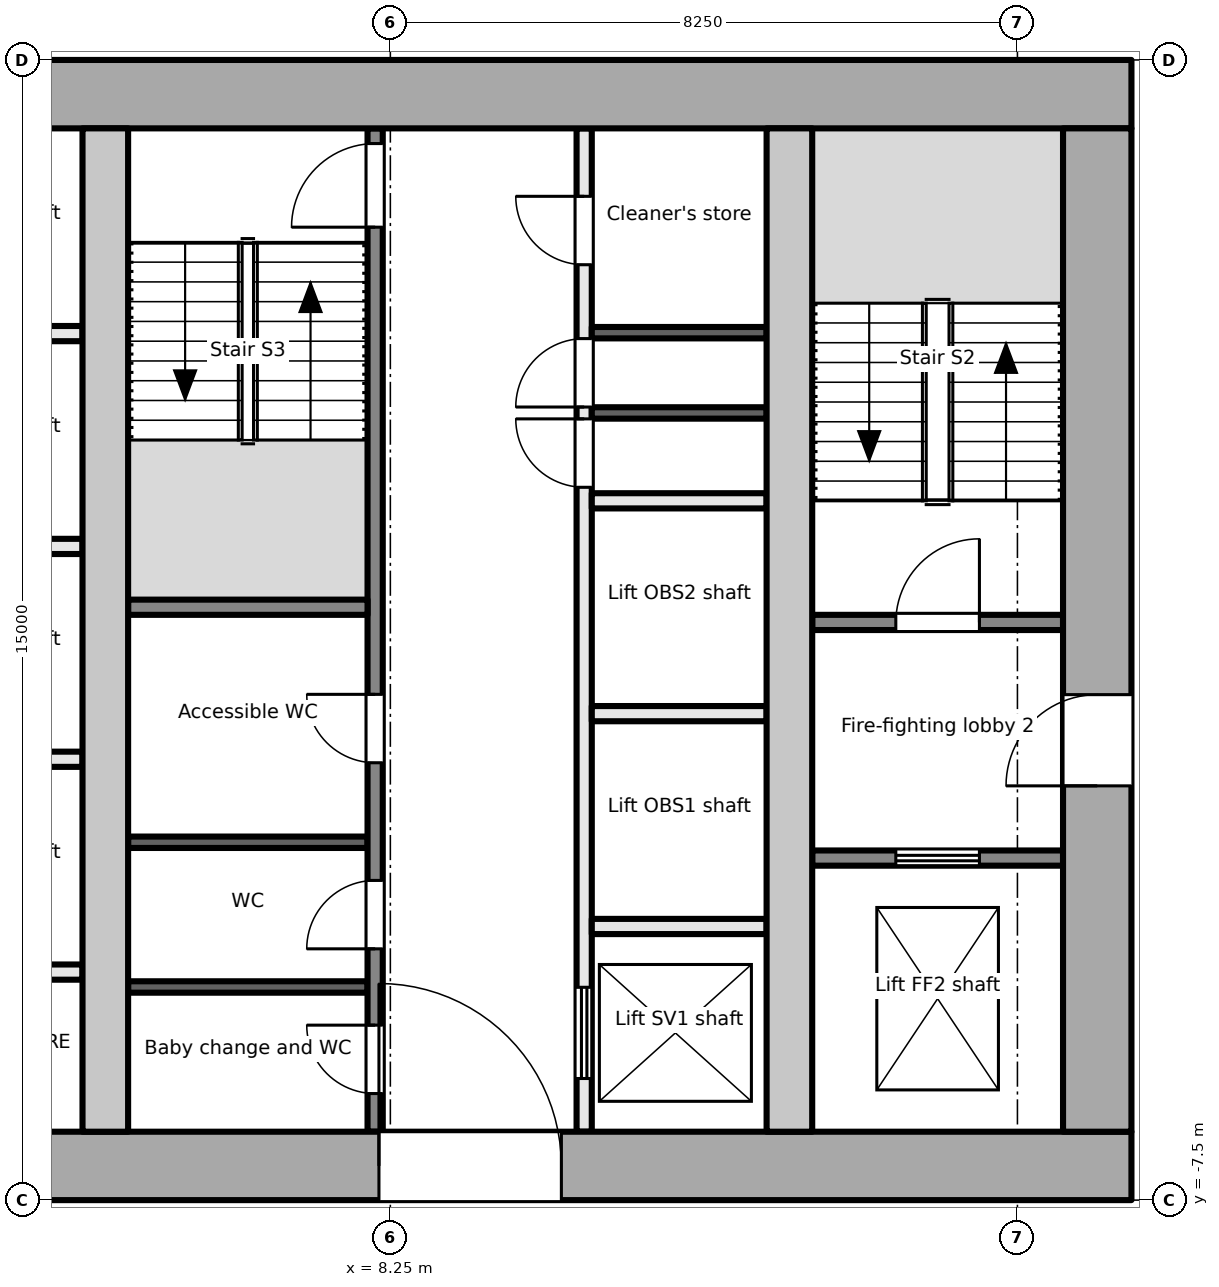
"""IFC4 building model, lengths in metres.
Left out: names, types, materials, properties, quantities, classifications, styles, units other than length and angle.
Written with IfcOpenShell. Run it as: python <this file> out.ifc"""

import sys

from ifc_helpers import new_model, si_unit, direction, frame, frame_2d, origin, place, context, subcontext, project, spatial, rectangle, extrude, element, fill, save


model = new_model("IFC4")
c1 = context("Model", 3, precision=1e-05, world=origin(), true_north=direction((0.0, 1.0)))
c2 = subcontext(c1, "Body", "Model", "MODEL_VIEW")
j1 = project(units=[si_unit("LENGTHUNIT", "METRE"), si_unit("PLANEANGLEUNIT", "RADIAN")], contexts=[c1])
p1 = place(None, origin())
s1 = spatial("IfcSite", under=j1, at=p1, CompositionType="ELEMENT")
p2 = place(p1, origin())
s2 = spatial("IfcBuilding", under=s1, at=p2, CompositionType="ELEMENT")
p3 = place(p2, frame((0.0, 0.0, 44.7)))
s3 = spatial("IfcBuildingStorey", under=s2, at=p3, CompositionType="ELEMENT", Elevation=44.7)
p4 = place(p3, frame((-18.0, -7.05, -0.2), z_axis=(0.0, 0.0, 1.0), x_axis=(1.0, 0.0, 0.0)))
e1 = element("IfcWall", 1, at=p4, inside=s3, PredefinedType="SHEAR", context=c2, shape_type="SweptSolid", body=[
    extrude(rectangle(XDim=36.0, YDim=0.9, at=frame_2d((18.0, 0.0))), origin(), (0.0, 0.0, 1.0), 4.1),
])
p5 = place(p4, frame((7.8, 0.0, 0.2)))
e2 = element("IfcOpeningElement", 2, at=p5, cuts=e1, PredefinedType="OPENING", context=c2, shape_type="SweptSolid", body=[
    extrude(rectangle(XDim=2.4, YDim=2.1, at=frame_2d((1.2, 1.05))), frame((0.0, 0.46, 0.0), z_axis=(0.0, -1.0, 0.0), x_axis=(1.0, 0.0, 0.0)), (0.0, 0.0, 1.0), 0.921),
])
p6 = place(p4, frame((17.4, 0.0, 0.2)))
e3 = element("IfcOpeningElement", 3, at=p6, cuts=e1, PredefinedType="OPENING", context=c2, shape_type="SweptSolid", body=[
    extrude(rectangle(XDim=1.2, YDim=2.1, at=frame_2d((0.6, 1.05))), frame((0.0, 0.46, 0.0), z_axis=(0.0, -1.0, 0.0), x_axis=(1.0, 0.0, 0.0)), (0.0, 0.0, 1.0), 0.921),
])
p7 = place(p4, frame((26.1, 0.0, 0.2)))
e4 = element("IfcOpeningElement", 4, at=p7, cuts=e1, PredefinedType="OPENING", context=c2, shape_type="SweptSolid", body=[
    extrude(rectangle(XDim=2.4, YDim=2.1, at=frame_2d((1.2, 1.05))), frame((0.0, 0.46, 0.0), z_axis=(0.0, -1.0, 0.0), x_axis=(1.0, 0.0, 0.0)), (0.0, 0.0, 1.0), 0.921),
])
p8 = place(p3, frame((-18.0, 7.05, -0.2), z_axis=(0.0, 0.0, 1.0), x_axis=(1.0, 0.0, 0.0)))
e5 = element("IfcWall", 5, at=p8, inside=s3, PredefinedType="SHEAR", context=c2, shape_type="SweptSolid", body=[
    extrude(rectangle(XDim=36.0, YDim=0.9, at=frame_2d((18.0, 0.0))), origin(), (0.0, 0.0, 1.0), 4.1),
])
p9 = place(p3, frame((17.55, -6.6, -0.2), z_axis=(0.0, 0.0, 1.0), x_axis=(0.0, 1.0, 0.0)))
e6 = element("IfcWall", 6, at=p9, inside=s3, PredefinedType="SHEAR", context=c2, shape_type="SweptSolid", body=[
    extrude(rectangle(XDim=13.2, YDim=0.9, at=frame_2d((6.6, 0.0))), origin(), (0.0, 0.0, 1.0), 4.1),
])
p10 = place(p9, frame((4.55, 0.0, 0.2)))
e7 = element("IfcOpeningElement", 7, at=p10, cuts=e6, PredefinedType="OPENING", context=c2, shape_type="SweptSolid", body=[
    extrude(rectangle(XDim=1.2, YDim=2.1, at=frame_2d((0.6, 1.05))), frame((0.0, 0.46, 0.0), z_axis=(0.0, -1.0, 0.0), x_axis=(1.0, 0.0, 0.0)), (0.0, 0.0, 1.0), 0.921),
])
for number, where, z_axis, x_axis in (
    (8, (4.5, -6.6, -0.2), (0.0, 0.0, 1.0), (0.0, 1.0, 0.0)),
    (9, (13.5, -6.6, -0.2), (0.0, 0.0, 1.0), (0.0, 1.0, 0.0)),
):
    element("IfcWall", number, at=place(p3, frame(where, z_axis=z_axis, x_axis=x_axis)), inside=s3, PredefinedType="SHEAR", context=c2, shape_type="SweptSolid", body=[
        extrude(rectangle(XDim=13.2, YDim=0.6, at=frame_2d((6.6, 0.0))), origin(), (0.0, 0.0, 1.0), 4.1),
    ])
p11 = place(p3, frame((13.8, -3.0, 0.0), z_axis=(0.0, 0.0, 1.0), x_axis=(1.0, 0.0, 0.0)))
e10 = element("IfcWall", 10, at=p11, inside=s3, PredefinedType="PARTITIONING", context=c2, shape_type="SweptSolid", body=[
    extrude(rectangle(XDim=3.3, YDim=0.2, at=frame_2d((1.65, 0.0))), origin(), (0.0, 0.0, 1.0), 3.9),
])
p12 = place(p11, frame((1.1, 0.0, 0.0)))
e11 = element("IfcOpeningElement", 11, at=p12, cuts=e10, PredefinedType="OPENING", context=c2, shape_type="SweptSolid", body=[
    extrude(rectangle(XDim=1.1, YDim=2.1, at=frame_2d((0.55, 1.05))), frame((0.0, 0.111, 0.0), z_axis=(0.0, -1.0, 0.0), x_axis=(1.0, 0.0, 0.0)), (0.0, 0.0, 1.0), 0.221),
])
p13 = place(p3, frame((13.8, 0.1, 0.0), z_axis=(0.0, 0.0, 1.0), x_axis=(1.0, 0.0, 0.0)))
e12 = element("IfcWall", 12, at=p13, inside=s3, PredefinedType="PARTITIONING", context=c2, shape_type="SweptSolid", body=[
    extrude(rectangle(XDim=3.3, YDim=0.2, at=frame_2d((1.65, 0.0))), origin(), (0.0, 0.0, 1.0), 3.9),
])
p14 = place(p13, frame((1.1, 0.0, 0.0)))
e13 = element("IfcOpeningElement", 13, at=p14, cuts=e12, PredefinedType="OPENING", context=c2, shape_type="SweptSolid", body=[
    extrude(rectangle(XDim=1.1, YDim=2.1, at=frame_2d((0.55, 1.05))), frame((0.0, 0.111, 0.0), z_axis=(0.0, -1.0, 0.0), x_axis=(1.0, 0.0, 0.0)), (0.0, 0.0, 1.0), 0.221),
])
for number, where, z_axis, x_axis in (
    (14, (1.9, -1.7, 0.0), (0.0, 0.0, 1.0), (1.0, 0.0, 0.0)),
    (15, (1.9, 1.1, 0.0), (0.0, 0.0, 1.0), (1.0, 0.0, 0.0)),
    (16, (1.9, 3.9, 0.0), (0.0, 0.0, 1.0), (1.0, 0.0, 0.0)),
    (17, (1.9, -4.5, 0.0), (0.0, 0.0, 1.0), (1.0, 0.0, 0.0)),
):
    element("IfcWall", number, at=place(p3, frame(where, z_axis=z_axis, x_axis=x_axis)), inside=s3, PredefinedType="PARTITIONING", context=c2, shape_type="SweptSolid", body=[
        extrude(rectangle(XDim=2.3, YDim=0.2, at=frame_2d((1.15, 0.0))), origin(), (0.0, 0.0, 1.0), 3.9),
    ])
p15 = place(p3, frame((8.05, -6.6, 0.0), z_axis=(0.0, 0.0, 1.0), x_axis=(0.0, 1.0, 0.0)))
e18 = element("IfcWall", 18, at=p15, inside=s3, PredefinedType="PARTITIONING", context=c2, shape_type="SweptSolid", body=[
    extrude(rectangle(XDim=13.2, YDim=0.2, at=frame_2d((6.6, 0.0))), origin(), (0.0, 0.0, 1.0), 3.9),
])
p16 = place(p15, frame((0.502, 0.0, 0.0)))
e19 = element("IfcOpeningElement", 19, at=p16, cuts=e18, PredefinedType="OPENING", context=c2, shape_type="SweptSolid", body=[
    extrude(rectangle(XDim=0.9, YDim=2.1, at=frame_2d((0.45, 1.05))), frame((0.0, 0.111, 0.0), z_axis=(0.0, -1.0, 0.0), x_axis=(1.0, 0.0, 0.0)), (0.0, 0.0, 1.0), 0.221),
])
p17 = place(p15, frame((2.406, 0.0, 0.0)))
e20 = element("IfcOpeningElement", 20, at=p17, cuts=e18, PredefinedType="OPENING", context=c2, shape_type="SweptSolid", body=[
    extrude(rectangle(XDim=0.9, YDim=2.1, at=frame_2d((0.45, 1.05))), frame((0.0, 0.111, 0.0), z_axis=(0.0, -1.0, 0.0), x_axis=(1.0, 0.0, 0.0)), (0.0, 0.0, 1.0), 0.221),
])
p18 = place(p15, frame((4.854, 0.0, 0.0)))
e21 = element("IfcOpeningElement", 21, at=p18, cuts=e18, PredefinedType="OPENING", context=c2, shape_type="SweptSolid", body=[
    extrude(rectangle(XDim=0.9, YDim=2.1, at=frame_2d((0.45, 1.05))), frame((0.0, 0.111, 0.0), z_axis=(0.0, -1.0, 0.0), x_axis=(1.0, 0.0, 0.0)), (0.0, 0.0, 1.0), 0.221),
])
p19 = place(p15, frame((11.9, 0.0, 0.0)))
e22 = element("IfcOpeningElement", 22, at=p19, cuts=e18, PredefinedType="OPENING", context=c2, shape_type="SweptSolid", body=[
    extrude(rectangle(XDim=1.1, YDim=2.1, at=frame_2d((0.55, 1.05))), frame((0.0, 0.111, 0.0), z_axis=(0.0, -1.0, 0.0), x_axis=(1.0, 0.0, 0.0)), (0.0, 0.0, 1.0), 0.221),
])
p20 = place(p3, frame((10.8, -6.6, 0.0), z_axis=(0.0, 0.0, 1.0), x_axis=(0.0, 1.0, 0.0)))
e23 = element("IfcWall", 23, at=p20, inside=s3, PredefinedType="PARTITIONING", context=c2, shape_type="SweptSolid", body=[
    extrude(rectangle(XDim=13.2, YDim=0.2, at=frame_2d((6.6, 0.0))), origin(), (0.0, 0.0, 1.0), 3.9),
])
p21 = place(p20, frame((0.7, 0.0, 0.0)))
e24 = element("IfcOpeningElement", 24, at=p21, cuts=e23, PredefinedType="OPENING", context=c2, shape_type="SweptSolid", body=[
    extrude(rectangle(XDim=1.2, YDim=2.1, at=frame_2d((0.6, 1.05))), frame((0.0, 0.111, 0.0), z_axis=(0.0, -1.0, 0.0), x_axis=(1.0, 0.0, 0.0)), (0.0, 0.0, 1.0), 0.221),
])
p22 = place(p20, frame((8.478, 0.0, 0.0)))
e25 = element("IfcOpeningElement", 25, at=p22, cuts=e23, PredefinedType="OPENING", context=c2, shape_type="SweptSolid", body=[
    extrude(rectangle(XDim=0.9, YDim=2.1, at=frame_2d((0.45, 1.05))), frame((0.0, 0.111, 0.0), z_axis=(0.0, -1.0, 0.0), x_axis=(1.0, 0.0, 0.0)), (0.0, 0.0, 1.0), 0.221),
])
p23 = place(p20, frame((9.534, 0.0, 0.0)))
e26 = element("IfcOpeningElement", 26, at=p23, cuts=e23, PredefinedType="OPENING", context=c2, shape_type="SweptSolid", body=[
    extrude(rectangle(XDim=0.9, YDim=2.1, at=frame_2d((0.45, 1.05))), frame((0.0, 0.111, 0.0), z_axis=(0.0, -1.0, 0.0), x_axis=(1.0, 0.0, 0.0)), (0.0, 0.0, 1.0), 0.221),
])
p24 = place(p20, frame((11.406, 0.0, 0.0)))
e27 = element("IfcOpeningElement", 27, at=p24, cuts=e23, PredefinedType="OPENING", context=c2, shape_type="SweptSolid", body=[
    extrude(rectangle(XDim=0.9, YDim=2.1, at=frame_2d((0.45, 1.05))), frame((0.0, 0.111, 0.0), z_axis=(0.0, -1.0, 0.0), x_axis=(1.0, 0.0, 0.0)), (0.0, 0.0, 1.0), 0.221),
])
p25 = place(p3, frame((4.8, 0.3, 0.0), z_axis=(0.0, 0.0, 1.0), x_axis=(1.0, 0.0, 0.0)))
e28 = element("IfcWall", 28, at=p25, inside=s3, PredefinedType="PARTITIONING", context=c2, shape_type="SweptSolid", body=[
    extrude(rectangle(XDim=3.15, YDim=0.2, at=frame_2d((1.575, 0.0))), origin(), (0.0, 0.0, 1.0), 3.9),
])
for number, where, z_axis, x_axis in (
    (29, (4.8, -4.696, 0.0), (0.0, 0.0, 1.0), (1.0, 0.0, 0.0)),
    (30, (4.8, -2.792, 0.0), (0.0, 0.0, 1.0), (1.0, 0.0, 0.0)),
):
    element("IfcWall", number, at=place(p3, frame(where, z_axis=z_axis, x_axis=x_axis)), inside=s3, PredefinedType="PARTITIONING", context=c2, shape_type="SweptSolid", body=[
        extrude(rectangle(XDim=3.15, YDim=0.15, at=frame_2d((1.575, 0.0))), origin(), (0.0, 0.0, 1.0), 3.9),
    ])
for number, where, z_axis, x_axis in (
    (31, (10.9, -3.9, 0.0), (0.0, 0.0, 1.0), (1.0, 0.0, 0.0)),
    (32, (10.9, -1.1, 0.0), (0.0, 0.0, 1.0), (1.0, 0.0, 0.0)),
    (33, (10.9, 1.7, 0.0), (0.0, 0.0, 1.0), (1.0, 0.0, 0.0)),
):
    element("IfcWall", number, at=place(p3, frame(where, z_axis=z_axis, x_axis=x_axis)), inside=s3, PredefinedType="PARTITIONING", context=c2, shape_type="SweptSolid", body=[
        extrude(rectangle(XDim=2.3, YDim=0.2, at=frame_2d((1.15, 0.0))), origin(), (0.0, 0.0, 1.0), 3.9),
    ])
for number, where, z_axis, x_axis in (
    (34, (10.9, 2.856, 0.0), (0.0, 0.0, 1.0), (1.0, 0.0, 0.0)),
    (35, (10.9, 3.912, 0.0), (0.0, 0.0, 1.0), (1.0, 0.0, 0.0)),
):
    element("IfcWall", number, at=place(p3, frame(where, z_axis=z_axis, x_axis=x_axis)), inside=s3, PredefinedType="PARTITIONING", context=c2, shape_type="SweptSolid", body=[
        extrude(rectangle(XDim=2.3, YDim=0.15, at=frame_2d((1.15, 0.0))), origin(), (0.0, 0.0, 1.0), 3.9),
    ])
p26 = place(p12, origin())
e36 = element("IfcDoor", 36, at=p26, inside=s3, OperationType="DOUBLE_DOOR_SLIDING", PredefinedType="DOOR", context=c2, shape_type="SweptSolid", body=[
    extrude(rectangle(XDim=1.1, YDim=2.1, at=frame_2d((0.55, 1.05))), frame((0.0, 0.025, 0.0), z_axis=(0.0, -1.0, 0.0), x_axis=(1.0, 0.0, 0.0)), (0.0, 0.0, 1.0), 0.05),
])
fill(e11, e36)
p27 = place(p10, origin())
e37 = element("IfcDoor", 37, at=p27, inside=s3, OperationType="SINGLE_SWING_LEFT", PredefinedType="DOOR", context=c2, shape_type="SweptSolid", body=[
    extrude(rectangle(XDim=1.2, YDim=2.1, at=frame_2d((0.6, 1.05))), frame((0.0, 0.025, 0.0), z_axis=(0.0, -1.0, 0.0), x_axis=(1.0, 0.0, 0.0)), (0.0, 0.0, 1.0), 0.05),
])
fill(e7, e37)
p28 = place(p14, origin())
e38 = element("IfcDoor", 38, at=p28, inside=s3, OperationType="SINGLE_SWING_RIGHT", PredefinedType="DOOR", context=c2, shape_type="SweptSolid", body=[
    extrude(rectangle(XDim=1.1, YDim=2.1, at=frame_2d((0.55, 1.05))), frame((0.0, 0.025, 0.0), z_axis=(0.0, -1.0, 0.0), x_axis=(1.0, 0.0, 0.0)), (0.0, 0.0, 1.0), 0.05),
])
fill(e13, e38)
p29 = place(p16, origin())
e39 = element("IfcDoor", 39, at=p29, inside=s3, OperationType="SINGLE_SWING_RIGHT", PredefinedType="DOOR", context=c2, shape_type="SweptSolid", body=[
    extrude(rectangle(XDim=0.9, YDim=2.1, at=frame_2d((0.45, 1.05))), frame((0.0, 0.025, 0.0), z_axis=(0.0, -1.0, 0.0), x_axis=(1.0, 0.0, 0.0)), (0.0, 0.0, 1.0), 0.05),
])
fill(e19, e39)
p30 = place(p17, origin())
e40 = element("IfcDoor", 40, at=p30, inside=s3, OperationType="SINGLE_SWING_LEFT", PredefinedType="DOOR", context=c2, shape_type="SweptSolid", body=[
    extrude(rectangle(XDim=0.9, YDim=2.1, at=frame_2d((0.45, 1.05))), frame((0.0, 0.025, 0.0), z_axis=(0.0, -1.0, 0.0), x_axis=(1.0, 0.0, 0.0)), (0.0, 0.0, 1.0), 0.05),
])
fill(e20, e40)
p31 = place(p18, origin())
e41 = element("IfcDoor", 41, at=p31, inside=s3, OperationType="SINGLE_SWING_RIGHT", PredefinedType="DOOR", context=c2, shape_type="SweptSolid", body=[
    extrude(rectangle(XDim=0.9, YDim=2.1, at=frame_2d((0.45, 1.05))), frame((0.0, 0.025, 0.0), z_axis=(0.0, -1.0, 0.0), x_axis=(1.0, 0.0, 0.0)), (0.0, 0.0, 1.0), 0.05),
])
fill(e21, e41)
p32 = place(p19, origin())
e42 = element("IfcDoor", 42, at=p32, inside=s3, OperationType="SINGLE_SWING_LEFT", PredefinedType="DOOR", context=c2, shape_type="SweptSolid", body=[
    extrude(rectangle(XDim=1.1, YDim=2.1, at=frame_2d((0.55, 1.05))), frame((0.0, 0.025, 0.0), z_axis=(0.0, -1.0, 0.0), x_axis=(1.0, 0.0, 0.0)), (0.0, 0.0, 1.0), 0.05),
])
fill(e22, e42)
p33 = place(p7, origin())
e43 = element("IfcDoor", 43, at=p33, inside=s3, OperationType="DOUBLE_DOOR_DOUBLE_SWING", PredefinedType="DOOR", context=c2, shape_type="SweptSolid", body=[
    extrude(rectangle(XDim=2.4, YDim=2.1, at=frame_2d((1.2, 1.05))), frame((0.0, 0.025, 0.0), z_axis=(0.0, -1.0, 0.0), x_axis=(1.0, 0.0, 0.0)), (0.0, 0.0, 1.0), 0.05),
])
fill(e4, e43)
p34 = place(p21, origin())
e44 = element("IfcDoor", 44, at=p34, inside=s3, OperationType="DOUBLE_DOOR_SLIDING", PredefinedType="DOOR", context=c2, shape_type="SweptSolid", body=[
    extrude(rectangle(XDim=1.2, YDim=2.1, at=frame_2d((0.6, 1.05))), frame((0.0, 0.025, 0.0), z_axis=(0.0, -1.0, 0.0), x_axis=(1.0, 0.0, 0.0)), (0.0, 0.0, 1.0), 0.05),
])
fill(e24, e44)
p35 = place(p22, origin())
e45 = element("IfcDoor", 45, at=p35, inside=s3, OperationType="SINGLE_SWING_RIGHT", PredefinedType="DOOR", context=c2, shape_type="SweptSolid", body=[
    extrude(rectangle(XDim=0.9, YDim=2.1, at=frame_2d((0.45, 1.05))), frame((0.0, 0.025, 0.0), z_axis=(0.0, -1.0, 0.0), x_axis=(1.0, 0.0, 0.0)), (0.0, 0.0, 1.0), 0.05),
])
fill(e25, e45)
p36 = place(p23, origin())
e46 = element("IfcDoor", 46, at=p36, inside=s3, OperationType="SINGLE_SWING_LEFT", PredefinedType="DOOR", context=c2, shape_type="SweptSolid", body=[
    extrude(rectangle(XDim=0.9, YDim=2.1, at=frame_2d((0.45, 1.05))), frame((0.0, 0.025, 0.0), z_axis=(0.0, -1.0, 0.0), x_axis=(1.0, 0.0, 0.0)), (0.0, 0.0, 1.0), 0.05),
])
fill(e26, e46)
p37 = place(p24, origin())
e47 = element("IfcDoor", 47, at=p37, inside=s3, OperationType="SINGLE_SWING_RIGHT", PredefinedType="DOOR", context=c2, shape_type="SweptSolid", body=[
    extrude(rectangle(XDim=0.9, YDim=2.1, at=frame_2d((0.45, 1.05))), frame((0.0, 0.025, 0.0), z_axis=(0.0, -1.0, 0.0), x_axis=(1.0, 0.0, 0.0)), (0.0, 0.0, 1.0), 0.05),
])
fill(e27, e47)
save(model, sys.argv[1])
